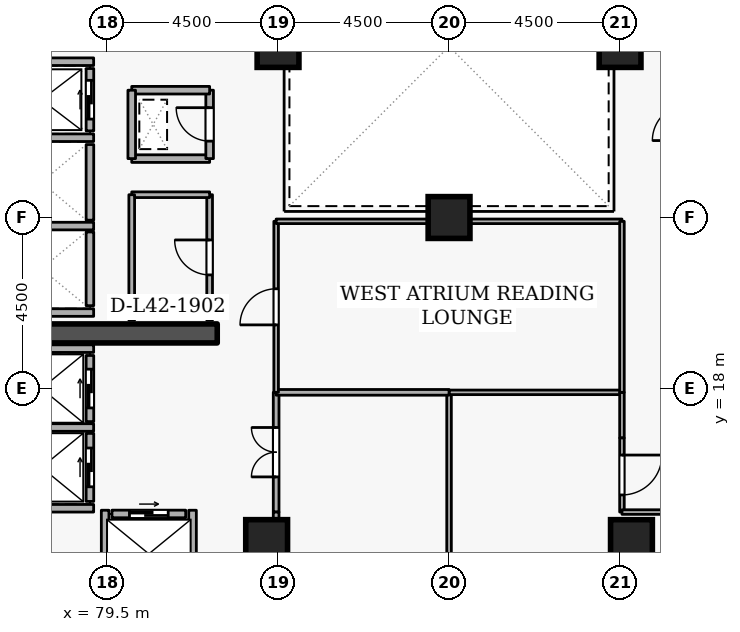
"""IFC4 building model, lengths in metres.
Left out: names, types, materials, properties, quantities, classifications, styles, units other than length and angle.
Written with IfcOpenShell. Run it as: python <this file> out.ifc"""

import sys

from ifc_helpers import new_model, si_unit, direction, frame, frame_2d, origin, origin_2d, place, context, subcontext, project, spatial, rectangle, extrude, element, fill, save


model = new_model("IFC4")
c1 = context("Model", 3, precision=1e-05, world=origin(), true_north=direction((0.0, 1.0)))
c2 = subcontext(c1, "Body", "Model", "MODEL_VIEW")
j1 = project(units=[si_unit("LENGTHUNIT", "METRE"), si_unit("PLANEANGLEUNIT", "RADIAN")], contexts=[c1])
p1 = place(None, origin())
s1 = spatial("IfcSite", under=j1, at=p1, CompositionType="ELEMENT")
p2 = place(p1, origin())
s2 = spatial("IfcBuilding", under=s1, at=p2, CompositionType="ELEMENT")
p3 = place(p2, frame((0.0, 0.0, 159.9)))
s3 = spatial("IfcBuildingStorey", under=s2, at=p3, CompositionType="ELEMENT", Elevation=159.9)
p4 = place(p3, frame((76.6, 19.45, 0.0), z_axis=(0.0, 0.0, 1.0), x_axis=(1.0, 0.0, 0.0)))
e1 = element("IfcWall", 1, at=p4, inside=s3, PredefinedType="SHEAR", context=c2, shape_type="SweptSolid", body=[
    extrude(rectangle(XDim=5.8, YDim=0.5, at=frame_2d((2.9, 0.0))), origin(), (0.0, 0.0, 1.0), 3.6),
])
for number, where, z_axis, x_axis in (
    (2, (93.3, 14.0, 0.0), (0.0, 0.0, 1.0), (1.0, 0.0, 0.0)),
    (3, (83.7, 14.0, 0.0), (0.0, 0.0, 1.0), (1.0, 0.0, 0.0)),
    (4, (93.0, 27.0, 0.0), (0.0, 0.0, 1.0), (1.0, 0.0, 0.0)),
    (5, (84.0, 27.0, 0.0), (0.0, 0.0, 1.0), (1.0, 0.0, 0.0)),
    (6, (88.5, 22.5, 0.0), (0.0, 0.0, 1.0), (1.0, 0.0, 0.0)),
):
    element("IfcColumn", number, at=place(p3, frame(where, z_axis=z_axis, x_axis=x_axis)), inside=s3, PredefinedType="COLUMN", context=c2, shape_type="SweptSolid", body=[
        extrude(rectangle(XDim=1.1, YDim=1.1, at=origin_2d()), origin(), (0.0, 0.0, 1.0), 3.6),
    ])
p5 = place(p3, frame((79.05, 24.78, 0.0), z_axis=(0.0, 0.0, 1.0), x_axis=(0.0, 1.0, 0.0)))
e7 = element("IfcWall", 7, at=p5, inside=s3, PredefinedType="STANDARD", context=c2, shape_type="SweptSolid", body=[
    extrude(rectangle(XDim=1.64, YDim=0.2, at=frame_2d((0.82, 0.0))), origin(), (0.0, 0.0, 1.0), 3.34),
])
p6 = place(p5, frame((0.31, 0.0, 0.0)))
e8 = element("IfcOpeningElement", 8, at=p6, cuts=e7, PredefinedType="OPENING", context=c2, shape_type="SweptSolid", body=[
    extrude(rectangle(XDim=1.02, YDim=2.06, at=frame_2d((0.51, 1.03))), frame((0.0, 0.11, 0.0), z_axis=(0.0, -1.0, 0.0), x_axis=(1.0, 0.0, 0.0)), (0.0, 0.0, 1.0), 0.22),
])
p7 = place(p3, frame((79.05, 22.43, 0.0), z_axis=(0.0, 0.0, 1.0), x_axis=(0.0, 1.0, 0.0)))
e9 = element("IfcWall", 9, at=p7, inside=s3, PredefinedType="STANDARD", context=c2, shape_type="SweptSolid", body=[
    extrude(rectangle(XDim=1.99, YDim=0.2, at=frame_2d((0.995, 0.0))), origin(), (0.0, 0.0, 1.0), 3.34),
])
p8 = place(p3, frame((79.05, 20.18, 0.0), z_axis=(0.0, 0.0, 1.0), x_axis=(0.0, 1.0, 0.0)))
e10 = element("IfcWall", 10, at=p8, inside=s3, PredefinedType="STANDARD", context=c2, shape_type="SweptSolid", body=[
    extrude(rectangle(XDim=1.94, YDim=0.2, at=frame_2d((0.97, 0.0))), origin(), (0.0, 0.0, 1.0), 3.34),
])
p9 = place(p3, frame((79.05, 17.13, 0.0), z_axis=(0.0, 0.0, 1.0), x_axis=(0.0, 1.0, 0.0)))
e11 = element("IfcWall", 11, at=p9, inside=s3, PredefinedType="STANDARD", context=c2, shape_type="SweptSolid", body=[
    extrude(rectangle(XDim=1.74, YDim=0.2, at=frame_2d((0.87, 0.0))), origin(), (0.0, 0.0, 1.0), 3.34),
])
p10 = place(p9, frame((0.36, 0.0, 0.0)))
e12 = element("IfcOpeningElement", 12, at=p10, cuts=e11, PredefinedType="OPENING", context=c2, shape_type="SweptSolid", body=[
    extrude(rectangle(XDim=1.02, YDim=2.06, at=frame_2d((0.51, 1.03))), frame((0.0, 0.11, 0.0), z_axis=(0.0, -1.0, 0.0), x_axis=(1.0, 0.0, 0.0)), (0.0, 0.0, 1.0), 0.22),
])
p11 = place(p3, frame((79.05, 15.03, 0.0), z_axis=(0.0, 0.0, 1.0), x_axis=(0.0, 1.0, 0.0)))
e13 = element("IfcWall", 13, at=p11, inside=s3, PredefinedType="STANDARD", context=c2, shape_type="SweptSolid", body=[
    extrude(rectangle(XDim=1.79, YDim=0.2, at=frame_2d((0.895, 0.0))), origin(), (0.0, 0.0, 1.0), 3.34),
])
p12 = place(p11, frame((0.385, 0.0, 0.0)))
e14 = element("IfcOpeningElement", 14, at=p12, cuts=e13, PredefinedType="OPENING", context=c2, shape_type="SweptSolid", body=[
    extrude(rectangle(XDim=1.02, YDim=2.06, at=frame_2d((0.51, 1.03))), frame((0.0, 0.11, 0.0), z_axis=(0.0, -1.0, 0.0), x_axis=(1.0, 0.0, 0.0)), (0.0, 0.0, 1.0), 0.22),
])
p13 = place(p3, frame((79.63, 14.7, 0.0), z_axis=(0.0, 0.0, 1.0), x_axis=(1.0, 0.0, 0.0)))
e15 = element("IfcWall", 15, at=p13, inside=s3, PredefinedType="STANDARD", context=c2, shape_type="SweptSolid", body=[
    extrude(rectangle(XDim=1.94, YDim=0.2, at=frame_2d((0.97, 0.0))), origin(), (0.0, 0.0, 1.0), 3.34),
])
p14 = place(p13, frame((0.46, 0.0, 0.0)))
e16 = element("IfcOpeningElement", 16, at=p14, cuts=e15, PredefinedType="OPENING", context=c2, shape_type="SweptSolid", body=[
    extrude(rectangle(XDim=1.02, YDim=2.06, at=frame_2d((0.51, 1.03))), frame((0.0, 0.11, 0.0), z_axis=(0.0, -1.0, 0.0), x_axis=(1.0, 0.0, 0.0)), (0.0, 0.0, 1.0), 0.22),
])
for number, where, z_axis, x_axis in (
    (17, (76.612, 26.6, 0.0), (0.0, 0.0, 1.0), (1.0, 0.0, 0.0)),
    (18, (76.612, 24.6, 0.0), (0.0, 0.0, 1.0), (1.0, 0.0, 0.0)),
    (19, (76.612, 22.275, 0.0), (0.0, 0.0, 1.0), (1.0, 0.0, 0.0)),
    (20, (76.612, 20.0, 0.0), (0.0, 0.0, 1.0), (1.0, 0.0, 0.0)),
):
    element("IfcWall", number, at=place(p3, frame(where, z_axis=z_axis, x_axis=x_axis)), inside=s3, PredefinedType="STANDARD", context=c2, shape_type="SweptSolid", body=[
        extrude(rectangle(XDim=2.536, YDim=0.2, at=frame_2d((1.268, 0.0))), origin(), (0.0, 0.0, 1.0), 3.34),
    ])
p15 = place(p3, frame((76.402, 19.05, 0.0), z_axis=(0.0, 0.0, 1.0), x_axis=(1.0, 0.0, 0.0)))
e21 = element("IfcWall", 21, at=p15, inside=s3, PredefinedType="STANDARD", context=c2, shape_type="SweptSolid", body=[
    extrude(rectangle(XDim=2.746, YDim=0.2, at=frame_2d((1.373, 0.0))), origin(), (0.0, 0.0, 1.0), 2.545),
])
p16 = place(p3, frame((76.402, 16.975, 0.0), z_axis=(0.0, 0.0, 1.0), x_axis=(1.0, 0.0, 0.0)))
e22 = element("IfcWall", 22, at=p16, inside=s3, PredefinedType="STANDARD", context=c2, shape_type="SweptSolid", body=[
    extrude(rectangle(XDim=2.746, YDim=0.2, at=frame_2d((1.373, 0.0))), origin(), (0.0, 0.0, 1.0), 3.34),
])
p17 = place(p3, frame((76.512, 14.85, 0.0), z_axis=(0.0, 0.0, 1.0), x_axis=(1.0, 0.0, 0.0)))
e23 = element("IfcWall", 23, at=p17, inside=s3, PredefinedType="STANDARD", context=c2, shape_type="SweptSolid", body=[
    extrude(rectangle(XDim=2.636, YDim=0.2, at=frame_2d((1.318, 0.0))), origin(), (0.0, 0.0, 1.0), 3.34),
])
for number, where, z_axis, x_axis in (
    (24, (81.75, 12.612, 0.0), (0.0, 0.0, 1.0), (0.0, 1.0, 0.0)),
    (25, (79.45, 12.612, 0.0), (0.0, 0.0, 1.0), (0.0, 1.0, 0.0)),
):
    element("IfcWall", number, at=place(p3, frame(where, z_axis=z_axis, x_axis=x_axis)), inside=s3, PredefinedType="STANDARD", context=c2, shape_type="SweptSolid", body=[
        extrude(rectangle(XDim=2.186, YDim=0.2, at=frame_2d((1.093, 0.0))), origin(), (0.0, 0.0, 1.0), 3.34),
    ])
p18 = place(p3, frame((80.15, 24.05, 0.0), z_axis=(0.0, 0.0, 1.0), x_axis=(1.0, 0.0, 0.0)))
e26 = element("IfcWall", 26, at=p18, inside=s3, PredefinedType="STANDARD", context=c2, shape_type="SweptSolid", body=[
    extrude(rectangle(XDim=2.05, YDim=0.2, at=frame_2d((1.025, 0.0))), origin(), (0.0, 0.0, 1.0), 3.34),
])
p19 = place(p3, frame((82.2, 24.05, 0.0), z_axis=(0.0, 0.0, 1.0), x_axis=(0.0, 1.0, 0.0)))
e27 = element("IfcWall", 27, at=p19, inside=s3, PredefinedType="STANDARD", context=c2, shape_type="SweptSolid", body=[
    extrude(rectangle(XDim=1.8, YDim=0.2, at=frame_2d((0.9, 0.0))), origin(), (0.0, 0.0, 1.0), 3.34),
])
p20 = place(p19, frame((0.46, 0.0, 0.0)))
e28 = element("IfcOpeningElement", 28, at=p20, cuts=e27, PredefinedType="OPENING", context=c2, shape_type="SweptSolid", body=[
    extrude(rectangle(XDim=0.88, YDim=2.04, at=frame_2d((0.44, 1.02))), frame((0.0, 0.11, 0.0), z_axis=(0.0, -1.0, 0.0), x_axis=(1.0, 0.0, 0.0)), (0.0, 0.0, 1.0), 0.22),
])
p21 = place(p3, frame((82.2, 25.85, 0.0), z_axis=(0.0, 0.0, 1.0), x_axis=(-1.0, 0.0, 0.0)))
e29 = element("IfcWall", 29, at=p21, inside=s3, PredefinedType="STANDARD", context=c2, shape_type="SweptSolid", body=[
    extrude(rectangle(XDim=2.05, YDim=0.2, at=frame_2d((1.025, 0.0))), origin(), (0.0, 0.0, 1.0), 3.34),
])
p22 = place(p3, frame((80.15, 25.85, 0.0), z_axis=(0.0, 0.0, 1.0), x_axis=(0.0, -1.0, 0.0)))
e30 = element("IfcWall", 30, at=p22, inside=s3, PredefinedType="STANDARD", context=c2, shape_type="SweptSolid", body=[
    extrude(rectangle(XDim=1.8, YDim=0.2, at=frame_2d((0.9, 0.0))), origin(), (0.0, 0.0, 1.0), 3.34),
])
p23 = place(p3, frame((82.2, 19.8, 0.0), z_axis=(0.0, 0.0, 1.0), x_axis=(0.0, 1.0, 0.0)))
e31 = element("IfcWall", 31, at=p23, inside=s3, PredefinedType="PARTITIONING", context=c2, shape_type="SweptSolid", body=[
    extrude(rectangle(XDim=3.3, YDim=0.15, at=frame_2d((1.65, 0.0))), origin(), (0.0, 0.0, 1.0), 3.34),
])
p24 = place(p23, frame((1.19, 0.0, 0.0)))
e32 = element("IfcOpeningElement", 32, at=p24, cuts=e31, PredefinedType="OPENING", context=c2, shape_type="SweptSolid", body=[
    extrude(rectangle(XDim=0.92, YDim=2.08, at=frame_2d((0.46, 1.04))), frame((0.0, 0.085, 0.0), z_axis=(0.0, -1.0, 0.0), x_axis=(1.0, 0.0, 0.0)), (0.0, 0.0, 1.0), 0.17),
])
p25 = place(p3, frame((82.2, 23.1, 0.0), z_axis=(0.0, 0.0, 1.0), x_axis=(-1.0, 0.0, 0.0)))
e33 = element("IfcWall", 33, at=p25, inside=s3, PredefinedType="PARTITIONING", context=c2, shape_type="SweptSolid", body=[
    extrude(rectangle(XDim=2.05, YDim=0.15, at=frame_2d((1.025, 0.0))), origin(), (0.0, 0.0, 1.0), 3.34),
])
p26 = place(p3, frame((80.15, 23.1, 0.0), z_axis=(0.0, 0.0, 1.0), x_axis=(0.0, -1.0, 0.0)))
e34 = element("IfcWall", 34, at=p26, inside=s3, PredefinedType="PARTITIONING", context=c2, shape_type="SweptSolid", body=[
    extrude(rectangle(XDim=3.3, YDim=0.15, at=frame_2d((1.65, 0.0))), origin(), (0.0, 0.0, 1.0), 3.34),
])
p27 = place(p3, frame((88.5, 9.28, 0.0), z_axis=(0.0, 0.0, 1.0), x_axis=(0.0, 1.0, 0.0)))
e35 = element("IfcWall", 35, at=p27, inside=s3, PredefinedType="PARTITIONING", context=c2, shape_type="SweptSolid", body=[
    extrude(rectangle(XDim=8.62, YDim=0.12, at=frame_2d((4.31, 0.0))), origin(), (0.0, 0.0, 1.0), 2.878),
])
p28 = place(p3, frame((88.5, 17.9, 0.0), z_axis=(0.0, 0.0, 1.0), x_axis=(1.0, 0.0, 0.0)))
e36 = element("IfcWall", 36, at=p28, inside=s3, PredefinedType="PARTITIONING", context=c2, shape_type="SweptSolid", body=[
    extrude(rectangle(XDim=4.55, YDim=0.12, at=frame_2d((2.275, 0.0))), origin(), (0.0, 0.0, 1.0), 3.34),
])
p29 = place(p3, frame((93.05, 17.9, 0.0), z_axis=(0.0, 0.0, 1.0), x_axis=(0.0, -1.0, 0.0)))
e37 = element("IfcWall", 37, at=p29, inside=s3, PredefinedType="PARTITIONING", context=c2, shape_type="SweptSolid", body=[
    extrude(rectangle(XDim=1.2, YDim=0.12, at=frame_2d((0.6, 0.0))), origin(), (0.0, 0.0, 1.0), 3.34),
])
p30 = place(p3, frame((93.05, 16.7, 0.0), z_axis=(0.0, 0.0, 1.0), x_axis=(0.0, -1.0, 0.0)))
e38 = element("IfcWall", 38, at=p30, inside=s3, PredefinedType="PARTITIONING", context=c2, shape_type="SweptSolid", body=[
    extrude(rectangle(XDim=1.95, YDim=0.12, at=frame_2d((0.975, 0.0))), origin(), (0.0, 0.0, 1.0), 3.34),
])
p31 = place(p30, frame((0.45, 0.0, 0.0)))
e39 = element("IfcOpeningElement", 39, at=p31, cuts=e38, PredefinedType="OPENING", context=c2, shape_type="SweptSolid", body=[
    extrude(rectangle(XDim=1.05, YDim=2.1, at=frame_2d((0.525, 1.05))), frame((0.0, 0.07, 0.0), z_axis=(0.0, -1.0, 0.0), x_axis=(1.0, 0.0, 0.0)), (0.0, 0.0, 1.0), 0.14),
])
p32 = place(p3, frame((93.05, 14.75, 0.0), z_axis=(0.0, 0.0, 1.0), x_axis=(1.0, 0.0, 0.0)))
e40 = element("IfcWall", 40, at=p32, inside=s3, PredefinedType="PARTITIONING", context=c2, shape_type="SweptSolid", body=[
    extrude(rectangle(XDim=1.75, YDim=0.12, at=frame_2d((0.875, 0.0))), origin(), (0.0, 0.0, 1.0), 3.34),
])
p33 = place(p3, frame((83.95, 14.75, 0.0), z_axis=(0.0, 0.0, 1.0), x_axis=(0.0, 1.0, 0.0)))
e41 = element("IfcWall", 41, at=p33, inside=s3, PredefinedType="PARTITIONING", context=c2, shape_type="SweptSolid", body=[
    extrude(rectangle(XDim=3.15, YDim=0.15, at=frame_2d((1.575, 0.0))), origin(), (0.0, 0.0, 1.0), 3.34),
])
p34 = place(p33, frame((0.925, 0.0, 0.0)))
e42 = element("IfcOpeningElement", 42, at=p34, cuts=e41, PredefinedType="OPENING", context=c2, shape_type="SweptSolid", body=[
    extrude(rectangle(XDim=1.3, YDim=2.12, at=frame_2d((0.65, 1.06))), frame((0.0, 0.085, 0.0), z_axis=(0.0, -1.0, 0.0), x_axis=(1.0, 0.0, 0.0)), (0.0, 0.0, 1.0), 0.17),
])
p35 = place(p3, frame((83.95, 17.9, 0.0), z_axis=(0.0, 0.0, 1.0), x_axis=(1.0, 0.0, 0.0)))
e43 = element("IfcWall", 43, at=p35, inside=s3, PredefinedType="PARTITIONING", context=c2, shape_type="SweptSolid", body=[
    extrude(rectangle(XDim=4.55, YDim=0.15, at=frame_2d((2.275, 0.0))), origin(), (0.0, 0.0, 1.0), 3.34),
])
p36 = place(p3, frame((83.95, 12.4, 0.0), z_axis=(0.0, 0.0, 1.0), x_axis=(0.0, 1.0, 0.0)))
e44 = element("IfcWall", 44, at=p36, inside=s3, PredefinedType="PARTITIONING", context=c2, shape_type="SweptSolid", body=[
    extrude(rectangle(XDim=2.35, YDim=0.15, at=frame_2d((1.175, 0.0))), origin(), (0.0, 0.0, 1.0), 3.34),
])
p37 = place(p3, frame((83.95, 17.9, 0.0), z_axis=(0.0, 0.0, 1.0), x_axis=(0.0, 1.0, 0.0)))
e45 = element("IfcWall", 45, at=p37, inside=s3, PredefinedType="PARTITIONING", context=c2, shape_type="SweptSolid", body=[
    extrude(rectangle(XDim=4.5, YDim=0.12, at=frame_2d((2.25, 0.0))), origin(), (0.0, 0.0, 1.0), 3.34),
])
p38 = place(p37, frame((1.775, 0.0, 0.0)))
e46 = element("IfcOpeningElement", 46, at=p38, cuts=e45, PredefinedType="OPENING", context=c2, shape_type="SweptSolid", body=[
    extrude(rectangle(XDim=0.95, YDim=2.1, at=frame_2d((0.475, 1.05))), frame((0.0, 0.07, 0.0), z_axis=(0.0, -1.0, 0.0), x_axis=(1.0, 0.0, 0.0)), (0.0, 0.0, 1.0), 0.14),
])
p39 = place(p3, frame((83.95, 22.4, 0.0), z_axis=(0.0, 0.0, 1.0), x_axis=(1.0, 0.0, 0.0)))
e47 = element("IfcWall", 47, at=p39, inside=s3, PredefinedType="PARTITIONING", context=c2, shape_type="SweptSolid", body=[
    extrude(rectangle(XDim=9.1, YDim=0.12, at=frame_2d((4.55, 0.0))), origin(), (0.0, 0.0, 1.0), 3.34),
])
p40 = place(p3, frame((93.05, 22.4, 0.0), z_axis=(0.0, 0.0, 1.0), x_axis=(0.0, -1.0, 0.0)))
e48 = element("IfcWall", 48, at=p40, inside=s3, PredefinedType="PARTITIONING", context=c2, shape_type="SweptSolid", body=[
    extrude(rectangle(XDim=4.5, YDim=0.12, at=frame_2d((2.25, 0.0))), origin(), (0.0, 0.0, 1.0), 3.34),
])
p41 = place(p6, origin())
e49 = element("IfcDoor", 49, at=p41, inside=s3, OperationType="SLIDING_TO_LEFT", PredefinedType="DOOR", context=c2, shape_type="SweptSolid", body=[
    extrude(rectangle(XDim=1.02, YDim=2.06, at=frame_2d((0.51, 1.03))), frame((0.0, 0.025, 0.0), z_axis=(0.0, -1.0, 0.0), x_axis=(1.0, 0.0, 0.0)), (0.0, 0.0, 1.0), 0.05),
])
fill(e8, e49)
p42 = place(p10, origin())
e50 = element("IfcDoor", 50, at=p42, inside=s3, OperationType="SLIDING_TO_LEFT", PredefinedType="DOOR", context=c2, shape_type="SweptSolid", body=[
    extrude(rectangle(XDim=1.02, YDim=2.06, at=frame_2d((0.51, 1.03))), frame((0.0, 0.025, 0.0), z_axis=(0.0, -1.0, 0.0), x_axis=(1.0, 0.0, 0.0)), (0.0, 0.0, 1.0), 0.05),
])
fill(e12, e50)
p43 = place(p12, origin())
e51 = element("IfcDoor", 51, at=p43, inside=s3, OperationType="SLIDING_TO_LEFT", PredefinedType="DOOR", context=c2, shape_type="SweptSolid", body=[
    extrude(rectangle(XDim=1.02, YDim=2.06, at=frame_2d((0.51, 1.03))), frame((0.0, 0.025, 0.0), z_axis=(0.0, -1.0, 0.0), x_axis=(1.0, 0.0, 0.0)), (0.0, 0.0, 1.0), 0.05),
])
fill(e14, e51)
p44 = place(p14, origin())
e52 = element("IfcDoor", 52, at=p44, inside=s3, OperationType="SLIDING_TO_LEFT", PredefinedType="DOOR", context=c2, shape_type="SweptSolid", body=[
    extrude(rectangle(XDim=1.02, YDim=2.06, at=frame_2d((0.51, 1.03))), frame((0.0, 0.025, 0.0), z_axis=(0.0, -1.0, 0.0), x_axis=(1.0, 0.0, 0.0)), (0.0, 0.0, 1.0), 0.05),
])
fill(e16, e52)
p45 = place(p20, origin())
e53 = element("IfcDoor", 53, at=p45, inside=s3, OperationType="SINGLE_SWING_RIGHT", PredefinedType="DOOR", context=c2, shape_type="SweptSolid", body=[
    extrude(rectangle(XDim=0.88, YDim=2.04, at=frame_2d((0.44, 1.02))), frame((0.0, 0.025, 0.0), z_axis=(0.0, -1.0, 0.0), x_axis=(1.0, 0.0, 0.0)), (0.0, 0.0, 1.0), 0.05),
])
fill(e28, e53)
p46 = place(p24, origin())
e54 = element("IfcDoor", 54, at=p46, inside=s3, OperationType="SINGLE_SWING_RIGHT", PredefinedType="DOOR", context=c2, shape_type="SweptSolid", body=[
    extrude(rectangle(XDim=0.92, YDim=2.08, at=frame_2d((0.46, 1.04))), frame((0.0, 0.025, 0.0), z_axis=(0.0, -1.0, 0.0), x_axis=(1.0, 0.0, 0.0)), (0.0, 0.0, 1.0), 0.05),
])
fill(e32, e54)
p47 = place(p31, origin())
e55 = element("IfcDoor", 55, at=p47, inside=s3, OperationType="SINGLE_SWING_LEFT", PredefinedType="DOOR", context=c2, shape_type="SweptSolid", body=[
    extrude(rectangle(XDim=1.05, YDim=2.1, at=frame_2d((0.525, 1.05))), frame((0.0, 0.025, 0.0), z_axis=(0.0, -1.0, 0.0), x_axis=(1.0, 0.0, 0.0)), (0.0, 0.0, 1.0), 0.05),
])
fill(e39, e55)
p48 = place(p34, origin())
e56 = element("IfcDoor", 56, at=p48, inside=s3, OperationType="DOUBLE_DOOR_SINGLE_SWING", PredefinedType="DOOR", context=c2, shape_type="SweptSolid", body=[
    extrude(rectangle(XDim=1.3, YDim=2.12, at=frame_2d((0.65, 1.06))), frame((0.0, 0.025, 0.0), z_axis=(0.0, -1.0, 0.0), x_axis=(1.0, 0.0, 0.0)), (0.0, 0.0, 1.0), 0.05),
])
fill(e42, e56)
p49 = place(p38, origin())
e57 = element("IfcDoor", 57, at=p49, inside=s3, OperationType="SINGLE_SWING_LEFT", PredefinedType="DOOR", context=c2, shape_type="SweptSolid", body=[
    extrude(rectangle(XDim=0.95, YDim=2.1, at=frame_2d((0.475, 1.05))), frame((0.0, 0.025, 0.0), z_axis=(0.0, -1.0, 0.0), x_axis=(1.0, 0.0, 0.0)), (0.0, 0.0, 1.0), 0.05),
])
fill(e46, e57)
save(model, sys.argv[1])
